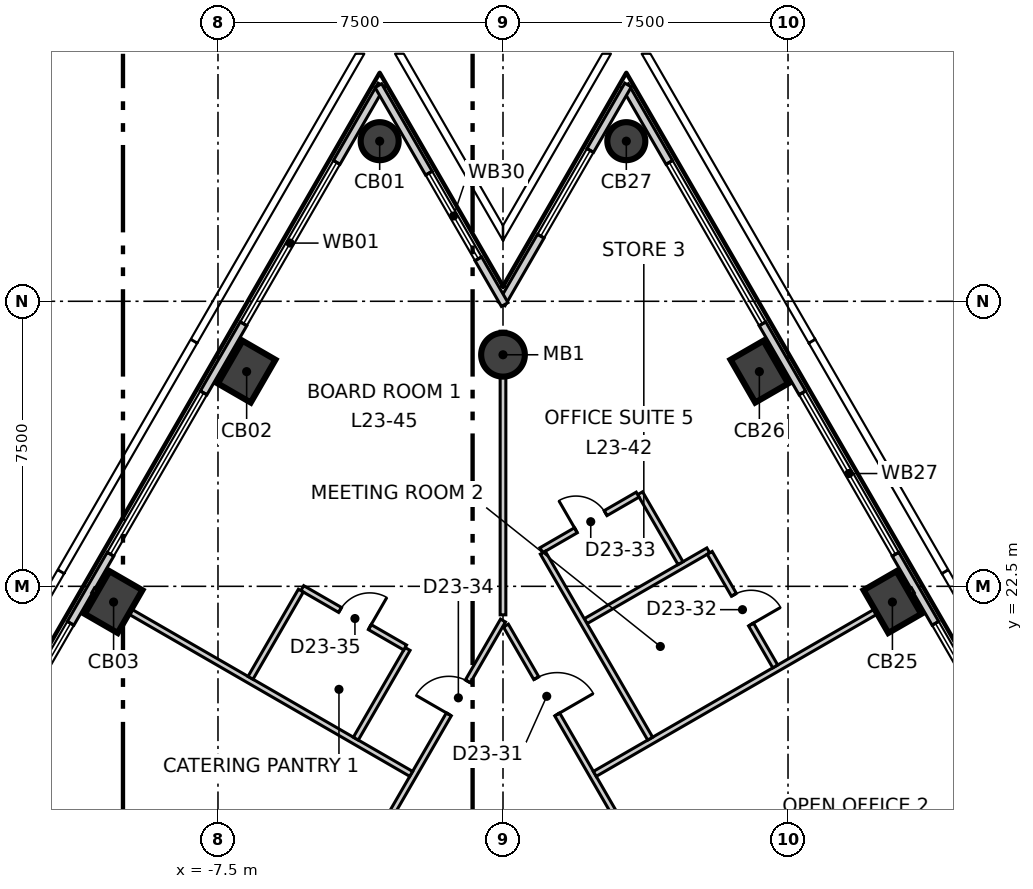
"""IFC4 building model, lengths in metres.
Left out: names, types, materials, properties, quantities, classifications, styles, units other than length and angle.
Written with IfcOpenShell. Run it as: python <this file> out.ifc"""

import sys

from ifc_helpers import new_model, si_unit, direction, frame, frame_2d, origin, origin_2d, place, context, subcontext, project, spatial, rectangle, circle, extrude, element, fill, save


model = new_model("IFC4")
c1 = context("Model", 3, precision=1e-05, world=origin(), true_north=direction((0.0, 1.0)))
c2 = subcontext(c1, "Body", "Model", "MODEL_VIEW")
j1 = project(units=[si_unit("LENGTHUNIT", "METRE"), si_unit("PLANEANGLEUNIT", "RADIAN")], contexts=[c1])
p1 = place(None, origin())
s1 = spatial("IfcSite", under=j1, at=p1, CompositionType="ELEMENT")
p2 = place(p1, origin())
s2 = spatial("IfcBuilding", under=s1, at=p2, CompositionType="ELEMENT")
p3 = place(p2, frame((0.0, 0.0, 104.3)))
s3 = spatial("IfcBuildingStorey", under=s2, at=p3, CompositionType="ELEMENT", Elevation=104.3)
p4 = place(p3, frame((-3.245, 34.213, -0.3), z_axis=(0.0, 0.0, 1.0), x_axis=(0.5, 0.866025403784, 0.0)))
e1 = element("IfcColumn", 1, at=p4, inside=s3, PredefinedType="COLUMN", context=c2, shape_type="SweptSolid", body=[
    extrude(circle(Radius=0.5, at=origin_2d()), origin(), (0.0, 0.0, 1.0), 4.0),
])
for number, where, z_axis, x_axis in (
    (2, (-6.746, 28.149, -0.3), (0.0, 0.0, 1.0), (0.5, 0.866, 0.0)),
    (3, (-10.247, 22.086, -0.3), (0.0, 0.0, 1.0), (0.5, 0.866, 0.0)),
    (4, (10.247, 22.086, -0.3), (0.0, 0.0, 1.0), (-0.5, 0.866, 0.0)),
    (5, (6.746, 28.149, -0.3), (0.0, 0.0, 1.0), (-0.5, 0.866, 0.0)),
):
    element("IfcColumn", number, at=place(p3, frame(where, z_axis=z_axis, x_axis=x_axis)), inside=s3, PredefinedType="COLUMN", context=c2, shape_type="SweptSolid", body=[
        extrude(rectangle(XDim=1.3, YDim=1.0, at=origin_2d()), origin(), (0.0, 0.0, 1.0), 4.0),
    ])
p5 = place(p3, frame((3.245, 34.213, -0.3), z_axis=(0.0, 0.0, 1.0), x_axis=(-0.5, 0.866025403784, 0.0)))
e6 = element("IfcColumn", 6, at=p5, inside=s3, PredefinedType="COLUMN", context=c2, shape_type="SweptSolid", body=[
    extrude(circle(Radius=0.5, at=origin_2d()), origin(), (0.0, 0.0, 1.0), 4.0),
])
p6 = place(p3, frame((0.0, 28.593, -0.3), z_axis=(0.0, 0.0, 1.0), x_axis=(1.0, 0.0, 0.0)))
e7 = element("IfcColumn", 7, at=p6, inside=s3, PredefinedType="COLUMN", context=c2, shape_type="SweptSolid", body=[
    extrude(circle(Radius=0.575, at=origin_2d()), origin(), (0.0, 0.0, 1.0), 4.0),
])
p7 = place(p3, frame((-3.2, 35.691, 0.0), z_axis=(0.0, 0.0, 1.0), x_axis=(-0.500010127185, -0.866019556773, 0.0)))
e8 = element("IfcWall", 8, at=p7, inside=s3, PredefinedType="ELEMENTEDWALL", context=c2, shape_type="SweptSolid", body=[
    extrude(rectangle(XDim=58.599, YDim=0.2, at=frame_2d((29.299, 0.0))), origin(), (0.0, 0.0, 1.0), 3.7),
])
p8 = place(p7, frame((2.353, 0.0, 0.9)))
e9 = element("IfcOpeningElement", 9, at=p8, cuts=e8, PredefinedType="OPENING", context=c2, shape_type="SweptSolid", body=[
    extrude(rectangle(XDim=4.9, YDim=2.5, at=frame_2d((2.45, 1.25))), frame((0.0, 0.11, 0.0), z_axis=(0.0, -1.0, 0.0), x_axis=(1.0, 0.0, 0.0)), (0.0, 0.0, 1.0), 0.22),
])
p9 = place(p7, frame((9.355, 0.0, 0.9)))
e10 = element("IfcOpeningElement", 10, at=p9, cuts=e8, PredefinedType="OPENING", context=c2, shape_type="SweptSolid", body=[
    extrude(rectangle(XDim=4.9, YDim=2.5, at=frame_2d((2.45, 1.25))), frame((0.0, 0.11, 0.0), z_axis=(0.0, -1.0, 0.0), x_axis=(1.0, 0.0, 0.0)), (0.0, 0.0, 1.0), 0.22),
])
p10 = place(p7, frame((16.357, 0.0, 0.9)))
e11 = element("IfcOpeningElement", 11, at=p10, cuts=e8, PredefinedType="OPENING", context=c2, shape_type="SweptSolid", body=[
    extrude(rectangle(XDim=4.9, YDim=2.5, at=frame_2d((2.45, 1.25))), frame((0.0, 0.11, 0.0), z_axis=(0.0, -1.0, 0.0), x_axis=(1.0, 0.0, 0.0)), (0.0, 0.0, 1.0), 0.22),
])
p11 = place(p7, frame((23.358, 0.0, 0.9)))
e12 = element("IfcOpeningElement", 12, at=p11, cuts=e8, PredefinedType="OPENING", context=c2, shape_type="SweptSolid", body=[
    extrude(rectangle(XDim=4.9, YDim=2.5, at=frame_2d((2.45, 1.25))), frame((0.0, 0.11, 0.0), z_axis=(0.0, -1.0, 0.0), x_axis=(1.0, 0.0, 0.0)), (0.0, 0.0, 1.0), 0.22),
])
p12 = place(p7, frame((30.36, 0.0, 0.9)))
e13 = element("IfcOpeningElement", 13, at=p12, cuts=e8, PredefinedType="OPENING", context=c2, shape_type="SweptSolid", body=[
    extrude(rectangle(XDim=4.9, YDim=2.5, at=frame_2d((2.45, 1.25))), frame((0.0, 0.11, 0.0), z_axis=(0.0, -1.0, 0.0), x_axis=(1.0, 0.0, 0.0)), (0.0, 0.0, 1.0), 0.22),
])
p13 = place(p7, frame((37.362, 0.0, 0.9)))
e14 = element("IfcOpeningElement", 14, at=p13, cuts=e8, PredefinedType="OPENING", context=c2, shape_type="SweptSolid", body=[
    extrude(rectangle(XDim=4.9, YDim=2.5, at=frame_2d((2.45, 1.25))), frame((0.0, 0.11, 0.0), z_axis=(0.0, -1.0, 0.0), x_axis=(1.0, 0.0, 0.0)), (0.0, 0.0, 1.0), 0.22),
])
p14 = place(p7, frame((44.363, 0.0, 0.9)))
e15 = element("IfcOpeningElement", 15, at=p14, cuts=e8, PredefinedType="OPENING", context=c2, shape_type="SweptSolid", body=[
    extrude(rectangle(XDim=4.9, YDim=2.5, at=frame_2d((2.45, 1.25))), frame((0.0, 0.11, 0.0), z_axis=(0.0, -1.0, 0.0), x_axis=(1.0, 0.0, 0.0)), (0.0, 0.0, 1.0), 0.22),
])
p15 = place(p7, frame((51.365, 0.0, 0.9)))
e16 = element("IfcOpeningElement", 16, at=p15, cuts=e8, PredefinedType="OPENING", context=c2, shape_type="SweptSolid", body=[
    extrude(rectangle(XDim=4.9, YDim=2.5, at=frame_2d((2.45, 1.25))), frame((0.0, 0.11, 0.0), z_axis=(0.0, -1.0, 0.0), x_axis=(1.0, 0.0, 0.0)), (0.0, 0.0, 1.0), 0.22),
])
p16 = place(p3, frame((32.51, -15.074, 0.0), z_axis=(0.0, 0.0, 1.0), x_axis=(-0.500008323105, 0.866020598384, 0.0)))
e17 = element("IfcWall", 17, at=p16, inside=s3, PredefinedType="ELEMENTEDWALL", context=c2, shape_type="SweptSolid", body=[
    extrude(rectangle(XDim=58.599, YDim=0.2, at=frame_2d((29.3, 0.0))), origin(), (0.0, 0.0, 1.0), 3.7),
])
p17 = place(p16, frame((2.354, 0.0, 0.9)))
e18 = element("IfcOpeningElement", 18, at=p17, cuts=e17, PredefinedType="OPENING", context=c2, shape_type="SweptSolid", body=[
    extrude(rectangle(XDim=4.9, YDim=2.5, at=frame_2d((2.45, 1.25))), frame((0.0, 0.11, 0.0), z_axis=(0.0, -1.0, 0.0), x_axis=(1.0, 0.0, 0.0)), (0.0, 0.0, 1.0), 0.22),
])
p18 = place(p16, frame((9.355, 0.0, 0.9)))
e19 = element("IfcOpeningElement", 19, at=p18, cuts=e17, PredefinedType="OPENING", context=c2, shape_type="SweptSolid", body=[
    extrude(rectangle(XDim=4.9, YDim=2.5, at=frame_2d((2.45, 1.25))), frame((0.0, 0.11, 0.0), z_axis=(0.0, -1.0, 0.0), x_axis=(1.0, 0.0, 0.0)), (0.0, 0.0, 1.0), 0.22),
])
p19 = place(p16, frame((16.357, 0.0, 0.9)))
e20 = element("IfcOpeningElement", 20, at=p19, cuts=e17, PredefinedType="OPENING", context=c2, shape_type="SweptSolid", body=[
    extrude(rectangle(XDim=4.9, YDim=2.5, at=frame_2d((2.45, 1.25))), frame((0.0, 0.11, 0.0), z_axis=(0.0, -1.0, 0.0), x_axis=(1.0, 0.0, 0.0)), (0.0, 0.0, 1.0), 0.22),
])
p20 = place(p16, frame((23.359, 0.0, 0.9)))
e21 = element("IfcOpeningElement", 21, at=p20, cuts=e17, PredefinedType="OPENING", context=c2, shape_type="SweptSolid", body=[
    extrude(rectangle(XDim=4.9, YDim=2.5, at=frame_2d((2.45, 1.25))), frame((0.0, 0.11, 0.0), z_axis=(0.0, -1.0, 0.0), x_axis=(1.0, 0.0, 0.0)), (0.0, 0.0, 1.0), 0.22),
])
p21 = place(p16, frame((30.36, 0.0, 0.9)))
e22 = element("IfcOpeningElement", 22, at=p21, cuts=e17, PredefinedType="OPENING", context=c2, shape_type="SweptSolid", body=[
    extrude(rectangle(XDim=4.9, YDim=2.5, at=frame_2d((2.45, 1.25))), frame((0.0, 0.11, 0.0), z_axis=(0.0, -1.0, 0.0), x_axis=(1.0, 0.0, 0.0)), (0.0, 0.0, 1.0), 0.22),
])
p22 = place(p16, frame((37.362, 0.0, 0.9)))
e23 = element("IfcOpeningElement", 23, at=p22, cuts=e17, PredefinedType="OPENING", context=c2, shape_type="SweptSolid", body=[
    extrude(rectangle(XDim=4.9, YDim=2.5, at=frame_2d((2.45, 1.25))), frame((0.0, 0.11, 0.0), z_axis=(0.0, -1.0, 0.0), x_axis=(1.0, 0.0, 0.0)), (0.0, 0.0, 1.0), 0.22),
])
p23 = place(p16, frame((44.364, 0.0, 0.9)))
e24 = element("IfcOpeningElement", 24, at=p23, cuts=e17, PredefinedType="OPENING", context=c2, shape_type="SweptSolid", body=[
    extrude(rectangle(XDim=4.9, YDim=2.5, at=frame_2d((2.45, 1.25))), frame((0.0, 0.11, 0.0), z_axis=(0.0, -1.0, 0.0), x_axis=(1.0, 0.0, 0.0)), (0.0, 0.0, 1.0), 0.22),
])
p24 = place(p16, frame((51.365, 0.0, 0.9)))
e25 = element("IfcOpeningElement", 25, at=p24, cuts=e17, PredefinedType="OPENING", context=c2, shape_type="SweptSolid", body=[
    extrude(rectangle(XDim=4.9, YDim=2.5, at=frame_2d((2.45, 1.25))), frame((0.0, 0.11, 0.0), z_axis=(0.0, -1.0, 0.0), x_axis=(1.0, 0.0, 0.0)), (0.0, 0.0, 1.0), 0.22),
])
p25 = place(p3, frame((3.29, 35.691, 0.0), z_axis=(0.0, 0.0, 1.0), x_axis=(-0.49999681972, -0.866027239912, 0.0)))
e26 = element("IfcWall", 26, at=p25, inside=s3, PredefinedType="ELEMENTEDWALL", context=c2, shape_type="SweptSolid", body=[
    extrude(rectangle(XDim=6.65, YDim=0.2, at=frame_2d((3.325, 0.0))), origin(), (0.0, 0.0, 1.0), 3.7),
])
p26 = place(p25, frame((1.99, 0.0, 0.9)))
e27 = element("IfcOpeningElement", 27, at=p26, cuts=e26, PredefinedType="OPENING", context=c2, shape_type="SweptSolid", body=[
    extrude(rectangle(XDim=2.6, YDim=2.5, at=frame_2d((1.3, 1.25))), frame((0.0, 0.11, 0.0), z_axis=(0.0, -1.0, 0.0), x_axis=(1.0, 0.0, 0.0)), (0.0, 0.0, 1.0), 0.22),
])
p27 = place(p3, frame((0.045, 29.915, 0.0), z_axis=(0.0, 0.0, 1.0), x_axis=(-0.49999681972, 0.866027239912, 0.0)))
e28 = element("IfcWall", 28, at=p27, inside=s3, PredefinedType="ELEMENTEDWALL", context=c2, shape_type="SweptSolid", body=[
    extrude(rectangle(XDim=6.65, YDim=0.2, at=frame_2d((3.325, 0.0))), origin(), (0.0, 0.0, 1.0), 3.7),
])
p28 = place(p27, frame((1.39, 0.0, 0.9)))
e29 = element("IfcOpeningElement", 29, at=p28, cuts=e28, PredefinedType="OPENING", context=c2, shape_type="SweptSolid", body=[
    extrude(rectangle(XDim=2.6, YDim=2.5, at=frame_2d((1.3, 1.25))), frame((0.0, 0.11, 0.0), z_axis=(0.0, -1.0, 0.0), x_axis=(1.0, 0.0, 0.0)), (0.0, 0.0, 1.0), 0.22),
])
p29 = place(p3, frame((-5.402, 12.244, 0.0), z_axis=(0.0, 0.0, 1.0), x_axis=(0.500020433321, 0.86601360628, 0.0)))
e30 = element("IfcWall", 30, at=p29, inside=s3, PredefinedType="PARTITIONING", context=c2, shape_type="SweptSolid", body=[
    extrude(rectangle(XDim=10.804, YDim=0.15, at=frame_2d((5.402, 0.0))), origin(), (0.0, 0.0, 1.0), 3.7),
])
p30 = place(p29, frame((7.954, 0.0, 0.0)))
e31 = element("IfcOpeningElement", 31, at=p30, cuts=e30, PredefinedType="OPENING", context=c2, shape_type="SweptSolid", body=[
    extrude(rectangle(XDim=1.0, YDim=2.1, at=frame_2d((0.5, 1.05))), frame((0.0, 0.085, 0.0), z_axis=(0.0, -1.0, 0.0), x_axis=(1.0, 0.0, 0.0)), (0.0, 0.0, 1.0), 0.17),
])
p31 = place(p29, frame((2.551, 0.0, 0.0)))
e32 = element("IfcOpeningElement", 32, at=p31, cuts=e30, PredefinedType="OPENING", context=c2, shape_type="SweptSolid", body=[
    extrude(rectangle(XDim=1.0, YDim=2.1, at=frame_2d((0.5, 1.05))), frame((0.0, 0.085, 0.0), z_axis=(0.0, -1.0, 0.0), x_axis=(1.0, 0.0, 0.0)), (0.0, 0.0, 1.0), 0.17),
])
p32 = place(p3, frame((-10.784, 22.396, 0.0), z_axis=(0.0, 0.0, 1.0), x_axis=(0.86603284879, -0.49998710465, 0.0)))
e33 = element("IfcWall", 33, at=p32, inside=s3, PredefinedType="PARTITIONING", context=c2, shape_type="SweptSolid", body=[
    extrude(rectangle(XDim=9.662, YDim=0.15, at=frame_2d((4.831, 0.0))), origin(), (0.0, 0.0, 1.0), 3.7),
])
p33 = place(p3, frame((0.0, 21.75, 0.0), z_axis=(0.0, 0.0, 1.0), x_axis=(0.0, 1.0, 0.0)))
e34 = element("IfcWall", 34, at=p33, inside=s3, PredefinedType="PARTITIONING", context=c2, shape_type="SweptSolid", body=[
    extrude(rectangle(XDim=7.463, YDim=0.15, at=frame_2d((3.731, 0.0))), origin(), (0.0, 0.0, 1.0), 3.15),
])
p34 = place(p3, frame((0.076, 21.468, 0.0), z_axis=(0.0, 0.0, 1.0), x_axis=(0.500024127084, -0.866011473558, 0.0)))
e35 = element("IfcWall", 35, at=p34, inside=s3, PredefinedType="PARTITIONING", context=c2, shape_type="SweptSolid", body=[
    extrude(rectangle(XDim=17.654, YDim=0.15, at=frame_2d((8.827, 0.0))), origin(), (0.0, 0.0, 1.0), 3.7),
])
p35 = place(p34, frame((8.104, 0.0, 0.0)))
e36 = element("IfcOpeningElement", 36, at=p35, cuts=e35, PredefinedType="OPENING", context=c2, shape_type="SweptSolid", body=[
    extrude(rectangle(XDim=1.1, YDim=2.1, at=frame_2d((0.55, 1.05))), frame((0.0, 0.085, 0.0), z_axis=(0.0, -1.0, 0.0), x_axis=(1.0, 0.0, 0.0)), (0.0, 0.0, 1.0), 0.17),
])
p36 = place(p34, frame((13.504, 0.0, 0.0)))
e37 = element("IfcOpeningElement", 37, at=p36, cuts=e35, PredefinedType="OPENING", context=c2, shape_type="SweptSolid", body=[
    extrude(rectangle(XDim=0.9, YDim=2.1, at=frame_2d((0.45, 1.05))), frame((0.0, 0.085, 0.0), z_axis=(0.0, -1.0, 0.0), x_axis=(1.0, 0.0, 0.0)), (0.0, 0.0, 1.0), 0.17),
])
p37 = place(p34, frame((1.6, 0.0, 0.0)))
e38 = element("IfcOpeningElement", 38, at=p37, cuts=e35, PredefinedType="OPENING", context=c2, shape_type="SweptSolid", body=[
    extrude(rectangle(XDim=1.1, YDim=2.1, at=frame_2d((0.55, 1.05))), frame((0.0, 0.085, 0.0), z_axis=(0.0, -1.0, 0.0), x_axis=(1.0, 0.0, 0.0)), (0.0, 0.0, 1.0), 0.17),
])
p38 = place(p3, frame((2.416, 17.565, 0.0), z_axis=(0.0, 0.0, 1.0), x_axis=(0.86603284879, 0.49998710465, 0.0)))
e39 = element("IfcWall", 39, at=p38, inside=s3, PredefinedType="PARTITIONING", context=c2, shape_type="SweptSolid", body=[
    extrude(rectangle(XDim=9.662, YDim=0.15, at=frame_2d((4.831, 0.0))), origin(), (0.0, 0.0, 1.0), 3.7),
])
p39 = place(p3, frame((-3.873, 18.492, 0.0), z_axis=(0.0, 0.0, 1.0), x_axis=(0.500117899823, 0.865957323588, 0.0)))
e40 = element("IfcWall", 40, at=p39, inside=s3, PredefinedType="PARTITIONING", context=c2, shape_type="SweptSolid", body=[
    extrude(rectangle(XDim=2.725, YDim=0.15, at=frame_2d((1.363, 0.0))), origin(), (0.0, 0.0, 1.0), 3.7),
])
p40 = place(p3, frame((-5.281, 22.452, 0.0), z_axis=(0.0, 0.0, 1.0), x_axis=(0.866071089505, -0.499920861661, 0.0)))
e41 = element("IfcWall", 41, at=p40, inside=s3, PredefinedType="PARTITIONING", context=c2, shape_type="SweptSolid", body=[
    extrude(rectangle(XDim=3.125, YDim=0.15, at=frame_2d((1.562, 0.0))), origin(), (0.0, 0.0, 1.0), 3.7),
])
p41 = place(p40, frame((1.149, 0.0, 0.0)))
e42 = element("IfcOpeningElement", 42, at=p41, cuts=e41, PredefinedType="OPENING", context=c2, shape_type="SweptSolid", body=[
    extrude(rectangle(XDim=0.9, YDim=2.1, at=frame_2d((0.45, 1.05))), frame((0.0, 0.085, 0.0), z_axis=(0.0, -1.0, 0.0), x_axis=(1.0, 0.0, 0.0)), (0.0, 0.0, 1.0), 0.17),
])
p42 = place(p3, frame((-6.644, 20.092, 0.0), z_axis=(0.0, 0.0, 1.0), x_axis=(0.499993606316, 0.866029095148, 0.0)))
e43 = element("IfcWall", 43, at=p42, inside=s3, PredefinedType="PARTITIONING", context=c2, shape_type="SweptSolid", body=[
    extrude(rectangle(XDim=2.65, YDim=0.15, at=frame_2d((1.325, 0.0))), origin(), (0.0, 0.0, 1.0), 3.7),
])
p43 = place(p3, frame((2.175, 21.583, 0.0), z_axis=(0.0, 0.0, 1.0), x_axis=(0.866068800491, 0.499924827166, 0.0)))
e44 = element("IfcWall", 44, at=p43, inside=s3, PredefinedType="PARTITIONING", context=c2, shape_type="SweptSolid", body=[
    extrude(rectangle(XDim=3.725, YDim=0.15, at=frame_2d((1.862, 0.0))), origin(), (0.0, 0.0, 1.0), 3.7),
])
p44 = place(p3, frame((3.608, 24.95, 0.0), z_axis=(0.0, 0.0, 1.0), x_axis=(0.500266112279, -0.865871709265, 0.0)))
e45 = element("IfcWall", 45, at=p44, inside=s3, PredefinedType="PARTITIONING", context=c2, shape_type="SweptSolid", body=[
    extrude(rectangle(XDim=2.125, YDim=0.15, at=frame_2d((1.062, 0.0))), origin(), (0.0, 0.0, 1.0), 3.7),
])
p45 = place(p3, frame((1.01, 23.45, 0.0), z_axis=(0.0, 0.0, 1.0), x_axis=(0.865917290158, 0.500187211558, 0.0)))
e46 = element("IfcWall", 46, at=p45, inside=s3, PredefinedType="PARTITIONING", context=c2, shape_type="SweptSolid", body=[
    extrude(rectangle(XDim=2.925, YDim=0.15, at=frame_2d((1.463, 0.0))), origin(), (0.0, 0.0, 1.0), 3.7),
])
p46 = place(p45, frame((1.05, 0.0, 0.0)))
e47 = element("IfcOpeningElement", 47, at=p46, cuts=e46, PredefinedType="OPENING", context=c2, shape_type="SweptSolid", body=[
    extrude(rectangle(XDim=0.9, YDim=2.1, at=frame_2d((0.45, 1.05))), frame((0.0, 0.085, 0.0), z_axis=(0.0, -1.0, 0.0), x_axis=(1.0, 0.0, 0.0)), (0.0, 0.0, 1.0), 0.17),
])
p47 = place(p3, frame((1.048, 23.385, 0.0), z_axis=(0.0, 0.0, 1.0), x_axis=(0.499991765245, -0.86603015807, 0.0)))
e48 = element("IfcWall", 48, at=p47, inside=s3, PredefinedType="PARTITIONING", context=c2, shape_type="SweptSolid", body=[
    extrude(rectangle(XDim=5.65, YDim=0.15, at=frame_2d((2.825, 0.0))), origin(), (0.0, 0.0, 1.0), 3.7),
])
p48 = place(p3, frame((5.439, 23.38, 0.0), z_axis=(0.0, 0.0, 1.0), x_axis=(0.500020560727, -0.866013532718, 0.0)))
e49 = element("IfcWall", 49, at=p48, inside=s3, PredefinedType="PARTITIONING", context=c2, shape_type="SweptSolid", body=[
    extrude(rectangle(XDim=3.45, YDim=0.15, at=frame_2d((1.725, 0.0))), origin(), (0.0, 0.0, 1.0), 3.7),
])
p49 = place(p48, frame((1.275, 0.0, 0.0)))
e50 = element("IfcOpeningElement", 50, at=p49, cuts=e49, PredefinedType="OPENING", context=c2, shape_type="SweptSolid", body=[
    extrude(rectangle(XDim=0.9, YDim=2.1, at=frame_2d((0.45, 1.05))), frame((0.0, 0.085, 0.0), z_axis=(0.0, -1.0, 0.0), x_axis=(1.0, 0.0, 0.0)), (0.0, 0.0, 1.0), 0.17),
])
p50 = place(p8, origin())
e51 = element("IfcWindow", 51, at=p50, inside=s3, PartitioningType="SINGLE_PANEL", PredefinedType="WINDOW", context=c2, shape_type="SweptSolid", body=[
    extrude(rectangle(XDim=4.9, YDim=2.5, at=frame_2d((2.45, 1.25))), frame((0.0, 0.03, 0.0), z_axis=(0.0, -1.0, 0.0), x_axis=(1.0, 0.0, 0.0)), (0.0, 0.0, 1.0), 0.06),
])
fill(e9, e51)
p51 = place(p9, origin())
e52 = element("IfcWindow", 52, at=p51, inside=s3, PartitioningType="SINGLE_PANEL", PredefinedType="WINDOW", context=c2, shape_type="SweptSolid", body=[
    extrude(rectangle(XDim=4.9, YDim=2.5, at=frame_2d((2.45, 1.25))), frame((0.0, 0.03, 0.0), z_axis=(0.0, -1.0, 0.0), x_axis=(1.0, 0.0, 0.0)), (0.0, 0.0, 1.0), 0.06),
])
fill(e10, e52)
p52 = place(p10, origin())
e53 = element("IfcWindow", 53, at=p52, inside=s3, PartitioningType="SINGLE_PANEL", PredefinedType="WINDOW", context=c2, shape_type="SweptSolid", body=[
    extrude(rectangle(XDim=4.9, YDim=2.5, at=frame_2d((2.45, 1.25))), frame((0.0, 0.03, 0.0), z_axis=(0.0, -1.0, 0.0), x_axis=(1.0, 0.0, 0.0)), (0.0, 0.0, 1.0), 0.06),
])
fill(e11, e53)
p53 = place(p22, origin())
e54 = element("IfcWindow", 54, at=p53, inside=s3, PartitioningType="SINGLE_PANEL", PredefinedType="WINDOW", context=c2, shape_type="SweptSolid", body=[
    extrude(rectangle(XDim=4.9, YDim=2.5, at=frame_2d((2.45, 1.25))), frame((0.0, 0.03, 0.0), z_axis=(0.0, -1.0, 0.0), x_axis=(1.0, 0.0, 0.0)), (0.0, 0.0, 1.0), 0.06),
])
fill(e23, e54)
p54 = place(p23, origin())
e55 = element("IfcWindow", 55, at=p54, inside=s3, PartitioningType="SINGLE_PANEL", PredefinedType="WINDOW", context=c2, shape_type="SweptSolid", body=[
    extrude(rectangle(XDim=4.9, YDim=2.5, at=frame_2d((2.45, 1.25))), frame((0.0, 0.03, 0.0), z_axis=(0.0, -1.0, 0.0), x_axis=(1.0, 0.0, 0.0)), (0.0, 0.0, 1.0), 0.06),
])
fill(e24, e55)
p55 = place(p24, origin())
e56 = element("IfcWindow", 56, at=p55, inside=s3, PartitioningType="SINGLE_PANEL", PredefinedType="WINDOW", context=c2, shape_type="SweptSolid", body=[
    extrude(rectangle(XDim=4.9, YDim=2.5, at=frame_2d((2.45, 1.25))), frame((0.0, 0.03, 0.0), z_axis=(0.0, -1.0, 0.0), x_axis=(1.0, 0.0, 0.0)), (0.0, 0.0, 1.0), 0.06),
])
fill(e25, e56)
p56 = place(p26, origin())
e57 = element("IfcWindow", 57, at=p56, inside=s3, PartitioningType="SINGLE_PANEL", PredefinedType="WINDOW", context=c2, shape_type="SweptSolid", body=[
    extrude(rectangle(XDim=2.6, YDim=2.5, at=frame_2d((1.3, 1.25))), frame((0.0, 0.03, 0.0), z_axis=(0.0, -1.0, 0.0), x_axis=(1.0, 0.0, 0.0)), (0.0, 0.0, 1.0), 0.06),
])
fill(e27, e57)
p57 = place(p28, origin())
e58 = element("IfcWindow", 58, at=p57, inside=s3, PartitioningType="SINGLE_PANEL", PredefinedType="WINDOW", context=c2, shape_type="SweptSolid", body=[
    extrude(rectangle(XDim=2.6, YDim=2.5, at=frame_2d((1.3, 1.25))), frame((0.0, 0.03, 0.0), z_axis=(0.0, -1.0, 0.0), x_axis=(1.0, 0.0, 0.0)), (0.0, 0.0, 1.0), 0.06),
])
fill(e29, e58)
p58 = place(p37, origin())
e59 = element("IfcDoor", 59, at=p58, inside=s3, OperationType="SINGLE_SWING_LEFT", PredefinedType="DOOR", context=c2, shape_type="SweptSolid", body=[
    extrude(rectangle(XDim=1.1, YDim=2.1, at=frame_2d((0.55, 1.05))), frame((0.0, 0.025, 0.0), z_axis=(0.0, -1.0, 0.0), x_axis=(1.0, 0.0, 0.0)), (0.0, 0.0, 1.0), 0.05),
])
fill(e38, e59)
p59 = place(p49, origin())
e60 = element("IfcDoor", 60, at=p59, inside=s3, OperationType="SINGLE_SWING_LEFT", PredefinedType="DOOR", context=c2, shape_type="SweptSolid", body=[
    extrude(rectangle(XDim=0.9, YDim=2.1, at=frame_2d((0.45, 1.05))), frame((0.0, 0.025, 0.0), z_axis=(0.0, -1.0, 0.0), x_axis=(1.0, 0.0, 0.0)), (0.0, 0.0, 1.0), 0.05),
])
fill(e50, e60)
p60 = place(p46, origin())
e61 = element("IfcDoor", 61, at=p60, inside=s3, OperationType="SINGLE_SWING_RIGHT", PredefinedType="DOOR", context=c2, shape_type="SweptSolid", body=[
    extrude(rectangle(XDim=0.9, YDim=2.1, at=frame_2d((0.45, 1.05))), frame((0.0, 0.025, 0.0), z_axis=(0.0, -1.0, 0.0), x_axis=(1.0, 0.0, 0.0)), (0.0, 0.0, 1.0), 0.05),
])
fill(e47, e61)
p61 = place(p30, origin())
e62 = element("IfcDoor", 62, at=p61, inside=s3, OperationType="SINGLE_SWING_RIGHT", PredefinedType="DOOR", context=c2, shape_type="SweptSolid", body=[
    extrude(rectangle(XDim=1.0, YDim=2.1, at=frame_2d((0.5, 1.05))), frame((0.0, 0.025, 0.0), z_axis=(0.0, -1.0, 0.0), x_axis=(1.0, 0.0, 0.0)), (0.0, 0.0, 1.0), 0.05),
])
fill(e31, e62)
p62 = place(p41, origin())
e63 = element("IfcDoor", 63, at=p62, inside=s3, OperationType="SINGLE_SWING_LEFT", PredefinedType="DOOR", context=c2, shape_type="SweptSolid", body=[
    extrude(rectangle(XDim=0.9, YDim=2.1, at=frame_2d((0.45, 1.05))), frame((0.0, 0.025, 0.0), z_axis=(0.0, -1.0, 0.0), x_axis=(1.0, 0.0, 0.0)), (0.0, 0.0, 1.0), 0.05),
])
fill(e42, e63)
save(model, sys.argv[1])
